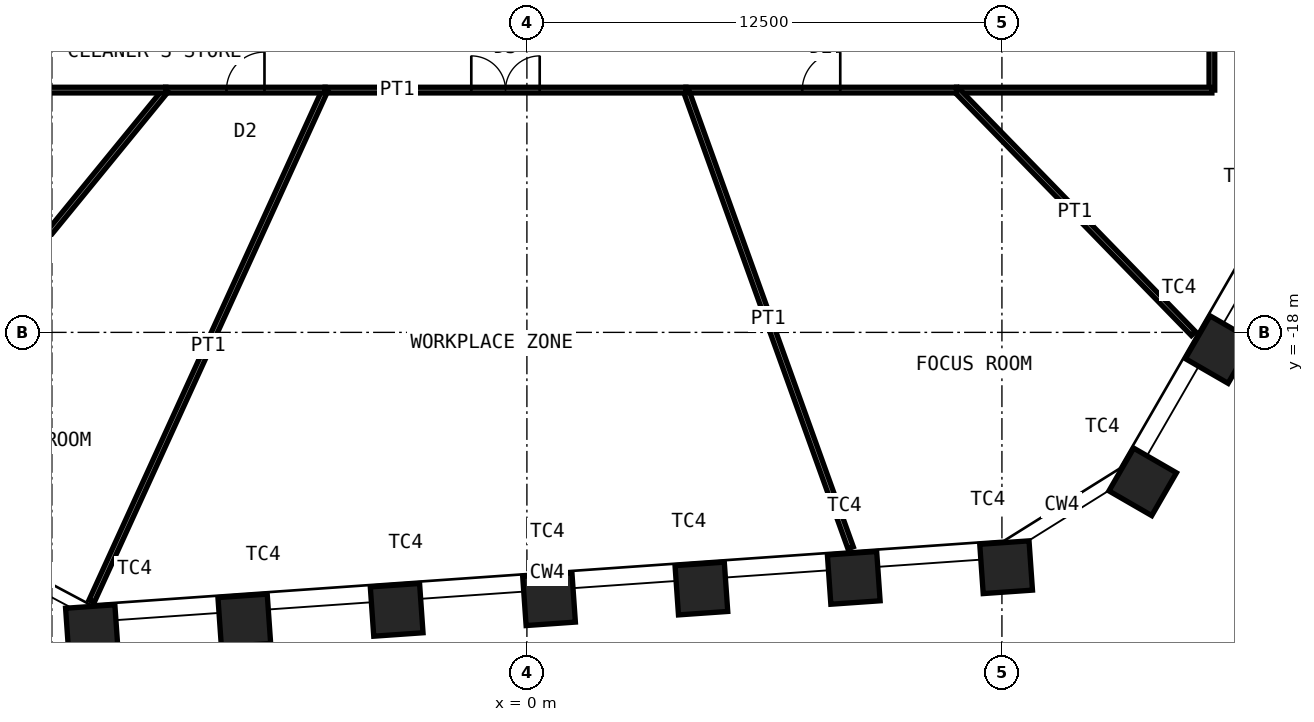
"""IFC4 building model, lengths in metres.
Left out: names, types, materials, properties, quantities, classifications, styles, units other than length and angle.
Written with IfcOpenShell. Run it as: python <this file> out.ifc"""

import sys

from ifc_helpers import new_model, si_unit, direction, frame, frame_2d, origin, origin_2d, place, context, subcontext, project, spatial, rectangle, hollow_rectangle, extrude, element, fill, save


model = new_model("IFC4")
c1 = context("Model", 3, precision=1e-05, world=origin(), true_north=direction((0.0, 1.0)))
c2 = subcontext(c1, "Body", "Model", "MODEL_VIEW")
j1 = project(units=[si_unit("LENGTHUNIT", "METRE"), si_unit("PLANEANGLEUNIT", "RADIAN")], contexts=[c1])
p1 = place(None, origin())
s1 = spatial("IfcSite", under=j1, at=p1, CompositionType="ELEMENT")
p2 = place(p1, origin())
s2 = spatial("IfcBuilding", under=s1, at=p2, CompositionType="ELEMENT")
p3 = place(p2, frame((0.0, 0.0, 149.2)))
s3 = spatial("IfcBuildingStorey", under=s2, at=p3, CompositionType="ELEMENT", Elevation=149.2)
for number, where, z_axis, x_axis in (
    (1, (18.214, -18.453, 0.0), (0.0, 0.0, 1.0), (0.5, 0.866, 0.0)),
    (2, (16.204, -21.933, 0.0), (0.0, 0.0, 1.0), (0.5, 0.866, 0.0)),
    (3, (12.61, -24.179, 0.0), (0.0, 0.0, 1.0), (0.998, 0.07, 0.0)),
    (4, (8.601, -24.46, 0.0), (0.0, 0.0, 1.0), (0.998, 0.07, 0.0)),
    (5, (4.592, -24.74, 0.0), (0.0, 0.0, 1.0), (0.998, 0.07, 0.0)),
    (6, (0.582, -25.02, 0.0), (0.0, 0.0, 1.0), (0.998, 0.07, 0.0)),
    (7, (-3.427, -25.301, 0.0), (0.0, 0.0, 1.0), (0.998, 0.07, 0.0)),
    (8, (-7.436, -25.581, 0.0), (0.0, 0.0, 1.0), (0.998, 0.07, 0.0)),
    (9, (-11.446, -25.861, 0.0), (0.0, 0.0, 1.0), (0.998, 0.07, 0.0)),
):
    element("IfcColumn", number, at=place(p3, frame(where, z_axis=z_axis, x_axis=x_axis)), inside=s3, PredefinedType="COLUMN", context=c2, shape_type="SweptSolid", body=[
        extrude(hollow_rectangle(XDim=1.3, YDim=1.3, WallThickness=0.1, at=origin_2d()), origin(), (0.0, 0.0, 1.0), 4.2),
    ])
p4 = place(p3, frame((18.025, -2.938, 0.0), z_axis=(0.0, 0.0, 1.0), x_axis=(0.0, -1.0, 0.0)))
e10 = element("IfcWall", 10, at=p4, inside=s3, PredefinedType="PARTITIONING", context=c2, shape_type="SweptSolid", body=[
    extrude(rectangle(XDim=8.687, YDim=0.15, at=frame_2d((4.344, 0.0))), origin(), (0.0, 0.0, 1.0), 4.03),
])
p5 = place(p4, frame((3.443, 0.0, 0.0)))
e11 = element("IfcOpeningElement", 11, at=p5, cuts=e10, PredefinedType="OPENING", context=c2, shape_type="SweptSolid", body=[
    extrude(rectangle(XDim=1.8, YDim=2.4, at=frame_2d((0.9, 1.2))), frame((0.0, 0.085, 0.0), z_axis=(0.0, -1.0, 0.0), x_axis=(1.0, 0.0, 0.0)), (0.0, 0.0, 1.0), 0.17),
])
p6 = place(p3, frame((18.025, -11.625, 0.0), z_axis=(0.0, 0.0, 1.0), x_axis=(-1.0, 0.0, 0.0)))
e12 = element("IfcWall", 12, at=p6, inside=s3, PredefinedType="PARTITIONING", context=c2, shape_type="SweptSolid", body=[
    extrude(rectangle(XDim=6.718, YDim=0.15, at=frame_2d((3.359, 0.0))), origin(), (0.0, 0.0, 1.0), 4.03),
])
p7 = place(p3, frame((17.538, -18.031, 0.0), z_axis=(0.0, 0.0, 1.0), x_axis=(-0.697230918085, 0.716846599257, 0.0)))
e13 = element("IfcWall", 13, at=p7, inside=s3, PredefinedType="PARTITIONING", context=c2, shape_type="SweptSolid", body=[
    extrude(rectangle(XDim=8.936, YDim=0.15, at=frame_2d((4.468, 0.0))), origin(), (0.0, 0.0, 1.0), 3.33),
])
p8 = place(p3, frame((11.307, -11.625, 0.0), z_axis=(0.0, 0.0, 1.0), x_axis=(-1.0, 0.0, 0.0)))
e14 = element("IfcWall", 14, at=p8, inside=s3, PredefinedType="PARTITIONING", context=c2, shape_type="SweptSolid", body=[
    extrude(rectangle(XDim=7.123, YDim=0.15, at=frame_2d((3.562, 0.0))), origin(), (0.0, 0.0, 1.0), 4.03),
])
p9 = place(p8, frame((3.062, 0.0, 0.0)))
e15 = element("IfcOpeningElement", 15, at=p9, cuts=e14, PredefinedType="OPENING", context=c2, shape_type="SweptSolid", body=[
    extrude(rectangle(XDim=1.0, YDim=2.4, at=frame_2d((0.5, 1.2))), frame((0.0, 0.085, 0.0), z_axis=(0.0, -1.0, 0.0), x_axis=(1.0, 0.0, 0.0)), (0.0, 0.0, 1.0), 0.17),
])
p10 = place(p3, frame((8.518, -23.667, 0.0), z_axis=(0.0, 0.0, 1.0), x_axis=(-0.338635030469, 0.940917805198, 0.0)))
e16 = element("IfcWall", 16, at=p10, inside=s3, PredefinedType="PARTITIONING", context=c2, shape_type="SweptSolid", body=[
    extrude(rectangle(XDim=12.798, YDim=0.15, at=frame_2d((6.399, 0.0))), origin(), (0.0, 0.0, 1.0), 3.33),
])
p11 = place(p3, frame((4.184, -11.625, 0.0), z_axis=(0.0, 0.0, 1.0), x_axis=(-1.0, 0.0, 0.0)))
e17 = element("IfcWall", 17, at=p11, inside=s3, PredefinedType="PARTITIONING", context=c2, shape_type="SweptSolid", body=[
    extrude(rectangle(XDim=9.494, YDim=0.15, at=frame_2d((4.747, 0.0))), origin(), (0.0, 0.0, 1.0), 4.03),
])
p12 = place(p11, frame((3.847, 0.0, 0.0)))
e18 = element("IfcOpeningElement", 18, at=p12, cuts=e17, PredefinedType="OPENING", context=c2, shape_type="SweptSolid", body=[
    extrude(rectangle(XDim=1.8, YDim=2.4, at=frame_2d((0.9, 1.2))), frame((0.0, 0.085, 0.0), z_axis=(0.0, -1.0, 0.0), x_axis=(1.0, 0.0, 0.0)), (0.0, 0.0, 1.0), 0.17),
])
p13 = place(p3, frame((-11.453, -25.072, 0.0), z_axis=(0.0, 0.0, 1.0), x_axis=(0.415494357555, 0.909595755729, 0.0)))
e19 = element("IfcWall", 19, at=p13, inside=s3, PredefinedType="PARTITIONING", context=c2, shape_type="SweptSolid", body=[
    extrude(rectangle(XDim=14.784, YDim=0.15, at=frame_2d((7.392, 0.0))), origin(), (0.0, 0.0, 1.0), 2.93),
])
p14 = place(p3, frame((-5.31, -11.625, 0.0), z_axis=(0.0, 0.0, 1.0), x_axis=(-1.0, 0.0, 0.0)))
e20 = element("IfcWall", 20, at=p14, inside=s3, PredefinedType="PARTITIONING", context=c2, shape_type="SweptSolid", body=[
    extrude(rectangle(XDim=4.19, YDim=0.15, at=frame_2d((2.095, 0.0))), origin(), (0.0, 0.0, 1.0), 4.03),
])
p15 = place(p14, frame((1.595, 0.0, 0.0)))
e21 = element("IfcOpeningElement", 21, at=p15, cuts=e20, PredefinedType="OPENING", context=c2, shape_type="SweptSolid", body=[
    extrude(rectangle(XDim=1.0, YDim=2.4, at=frame_2d((0.5, 1.2))), frame((0.0, 0.085, 0.0), z_axis=(0.0, -1.0, 0.0), x_axis=(1.0, 0.0, 0.0)), (0.0, 0.0, 1.0), 0.17),
])
p16 = place(p3, frame((-16.38, -20.042, 0.0), z_axis=(0.0, 0.0, 1.0), x_axis=(0.632814540967, 0.774303400962, 0.0)))
e22 = element("IfcWall", 22, at=p16, inside=s3, PredefinedType="PARTITIONING", context=c2, shape_type="SweptSolid", body=[
    extrude(rectangle(XDim=10.871, YDim=0.15, at=frame_2d((5.435, 0.0))), origin(), (0.0, 0.0, 1.0), 3.33),
])
p17 = place(p3, frame((-9.501, -11.625, 0.0), z_axis=(0.0, 0.0, 1.0), x_axis=(-1.0, 0.0, 0.0)))
e23 = element("IfcWall", 23, at=p17, inside=s3, PredefinedType="PARTITIONING", context=c2, shape_type="SweptSolid", body=[
    extrude(rectangle(XDim=8.577, YDim=0.15, at=frame_2d((4.288, 0.0))), origin(), (0.0, 0.0, 1.0), 4.03),
])
p18 = place(p17, frame((3.788, 0.0, 0.0)))
e24 = element("IfcOpeningElement", 24, at=p18, cuts=e23, PredefinedType="OPENING", context=c2, shape_type="SweptSolid", body=[
    extrude(rectangle(XDim=1.0, YDim=2.4, at=frame_2d((0.5, 1.2))), frame((0.0, 0.085, 0.0), z_axis=(0.0, -1.0, 0.0), x_axis=(1.0, 0.0, 0.0)), (0.0, 0.0, 1.0), 0.17),
])
p19 = place(p9, origin())
e25 = element("IfcDoor", 25, at=p19, inside=s3, OperationType="SINGLE_SWING_LEFT", PredefinedType="DOOR", context=c2, shape_type="SweptSolid", body=[
    extrude(rectangle(XDim=1.0, YDim=2.4, at=frame_2d((0.5, 1.2))), frame((0.0, 0.025, 0.0), z_axis=(0.0, -1.0, 0.0), x_axis=(1.0, 0.0, 0.0)), (0.0, 0.0, 1.0), 0.05),
])
fill(e15, e25)
p20 = place(p12, origin())
e26 = element("IfcDoor", 26, at=p20, inside=s3, OperationType="DOUBLE_DOOR_DOUBLE_SWING", PredefinedType="DOOR", context=c2, shape_type="SweptSolid", body=[
    extrude(rectangle(XDim=1.8, YDim=2.4, at=frame_2d((0.9, 1.2))), frame((0.0, 0.025, 0.0), z_axis=(0.0, -1.0, 0.0), x_axis=(1.0, 0.0, 0.0)), (0.0, 0.0, 1.0), 0.05),
])
fill(e18, e26)
p21 = place(p15, origin())
e27 = element("IfcDoor", 27, at=p21, inside=s3, OperationType="SINGLE_SWING_LEFT", PredefinedType="DOOR", context=c2, shape_type="SweptSolid", body=[
    extrude(rectangle(XDim=1.0, YDim=2.4, at=frame_2d((0.5, 1.2))), frame((0.0, 0.025, 0.0), z_axis=(0.0, -1.0, 0.0), x_axis=(1.0, 0.0, 0.0)), (0.0, 0.0, 1.0), 0.05),
])
fill(e21, e27)
save(model, sys.argv[1])
